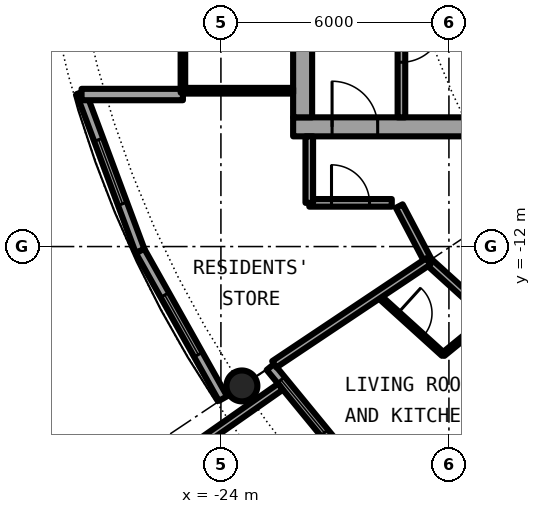
"""IFC4 building model, lengths in metres.
Left out: names, types, materials, properties, quantities, classifications, styles, units other than length and angle.
Written with IfcOpenShell. Run it as: python <this file> out.ifc"""

import sys

from ifc_helpers import new_model, si_unit, direction, frame, frame_2d, origin, origin_2d, place, context, subcontext, project, spatial, rectangle, hollow_circle, extrude, element, fill, save


model = new_model("IFC4")
c1 = context("Model", 3, precision=1e-05, world=origin(), true_north=direction((0.0, 1.0)))
c2 = subcontext(c1, "Body", "Model", "MODEL_VIEW")
j1 = project(units=[si_unit("LENGTHUNIT", "METRE"), si_unit("PLANEANGLEUNIT", "RADIAN")], contexts=[c1])
p1 = place(None, origin())
s1 = spatial("IfcSite", under=j1, at=p1, CompositionType="ELEMENT")
p2 = place(p1, origin())
s2 = spatial("IfcBuilding", under=s1, at=p2, CompositionType="ELEMENT")
p3 = place(p2, frame((0.0, 0.0, 161.6)))
s3 = spatial("IfcBuildingStorey", under=s2, at=p3, CompositionType="ELEMENT", Elevation=161.6)
p4 = place(p3, frame((-23.448, -15.667, 0.0), z_axis=(0.0, 0.0, 1.0), x_axis=(1.0, 0.0, 0.0)))
e1 = element("IfcColumn", 1, at=p4, inside=s3, PredefinedType="COLUMN", context=c2, shape_type="SweptSolid", body=[
    extrude(hollow_circle(Radius=0.406, WallThickness=0.04, at=origin_2d()), origin(), (0.0, 0.0, 1.0), 3.05),
])
p5 = place(p3, frame((-22.699, -15.167, 0.0), z_axis=(0.0, 0.0, 1.0), x_axis=(0.634382322723, -0.773019449054, 0.0)))
e2 = element("IfcWall", 2, at=p5, inside=s3, PredefinedType="SOLIDWALL", context=c2, shape_type="SweptSolid", body=[
    extrude(rectangle(XDim=5.352, YDim=0.25, at=frame_2d((2.676, 0.0))), origin(), (0.0, 0.0, 1.0), 2.7),
])
p6 = place(p5, frame((0.441, 0.0, 0.3)))
e3 = element("IfcOpeningElement", 3, at=p6, cuts=e2, PredefinedType="OPENING", context=c2, shape_type="SweptSolid", body=[
    extrude(rectangle(XDim=1.8, YDim=2.1, at=frame_2d((0.9, 1.05))), frame((0.0, 0.135, 0.0), z_axis=(0.0, -1.0, 0.0), x_axis=(1.0, 0.0, 0.0)), (0.0, 0.0, 1.0), 0.27),
])
p7 = place(p5, frame((3.51, 0.0, 0.0)))
e4 = element("IfcOpeningElement", 4, at=p7, cuts=e2, PredefinedType="OPENING", context=c2, shape_type="SweptSolid", body=[
    extrude(rectangle(XDim=1.0, YDim=2.2, at=frame_2d((0.5, 1.1))), frame((0.0, 0.135, 0.0), z_axis=(0.0, -1.0, 0.0), x_axis=(1.0, 0.0, 0.0)), (0.0, 0.0, 1.0), 0.27),
])
p8 = place(p3, frame((-22.433, -15.688, -0.03), z_axis=(0.0, 0.0, 1.0), x_axis=(-0.819373043115, -0.573260687834, 0.0)))
e5 = element("IfcWall", 5, at=p8, inside=s3, PredefinedType="SOLIDWALL", context=c2, shape_type="SweptSolid", body=[
    extrude(rectangle(XDim=2.925, YDim=0.2, at=frame_2d((1.463, 0.0))), origin(), (0.0, 0.0, 1.0), 2.73),
])
p9 = place(p3, frame((-27.682, -7.945, 0.0), z_axis=(0.0, 0.0, 1.0), x_axis=(0.349247811493, -0.937030397675, 0.0)))
e6 = element("IfcWall", 6, at=p9, inside=s3, PredefinedType="SOLIDWALL", context=c2, shape_type="SweptSolid", body=[
    extrude(rectangle(XDim=4.452, YDim=0.25, at=frame_2d((2.226, 0.0))), origin(), (0.0, 0.0, 1.0), 2.7),
])
p10 = place(p9, frame((1.327, 0.0, 0.3)))
e7 = element("IfcOpeningElement", 7, at=p10, cuts=e6, PredefinedType="OPENING", context=c2, shape_type="SweptSolid", body=[
    extrude(rectangle(XDim=1.8, YDim=2.1, at=frame_2d((0.9, 1.05))), frame((0.0, 0.135, 0.0), z_axis=(0.0, -1.0, 0.0), x_axis=(1.0, 0.0, 0.0)), (0.0, 0.0, 1.0), 0.27),
])
p11 = place(p3, frame((-26.127, -12.117, 0.0), z_axis=(0.0, 0.0, 1.0), x_axis=(0.489696356642, -0.871893042919, 0.0)))
e8 = element("IfcWall", 8, at=p11, inside=s3, PredefinedType="SOLIDWALL", context=c2, shape_type="SweptSolid", body=[
    extrude(rectangle(XDim=4.454, YDim=0.25, at=frame_2d((2.227, 0.0))), origin(), (0.0, 0.0, 1.0), 2.7),
])
p12 = place(p11, frame((1.327, 0.0, 0.3)))
e9 = element("IfcOpeningElement", 9, at=p12, cuts=e8, PredefinedType="OPENING", context=c2, shape_type="SweptSolid", body=[
    extrude(rectangle(XDim=1.8, YDim=2.1, at=frame_2d((0.9, 1.05))), frame((0.0, 0.135, 0.0), z_axis=(0.0, -1.0, 0.0), x_axis=(1.0, 0.0, 0.0)), (0.0, 0.0, 1.0), 0.27),
])
p13 = place(p3, frame((-25.0, -8.0, 0.0), z_axis=(0.0, 0.0, 1.0), x_axis=(-1.0, 0.0, 0.0)))
e10 = element("IfcWall", 10, at=p13, inside=s3, PredefinedType="SOLIDWALL", context=c2, shape_type="SweptSolid", body=[
    extrude(rectangle(XDim=2.667, YDim=0.3, at=frame_2d((1.333, 0.0))), origin(), (0.0, 0.0, 1.0), 2.7),
])
p14 = place(p3, frame((-22.1, -8.85, 0.0), z_axis=(0.0, 0.0, 1.0), x_axis=(1.0, 0.0, 0.0)))
e11 = element("IfcWall", 11, at=p14, inside=s3, PredefinedType="SHEAR", context=c2, shape_type="SweptSolid", body=[
    extrude(rectangle(XDim=13.6, YDim=0.5, at=frame_2d((6.8, 0.0))), origin(), (0.0, 0.0, 1.0), 3.05),
])
p15 = place(p14, frame((1.025, 0.0, 0.0)))
e12 = element("IfcOpeningElement", 12, at=p15, cuts=e11, PredefinedType="OPENING", context=c2, shape_type="SweptSolid", body=[
    extrude(rectangle(XDim=1.2, YDim=2.3, at=frame_2d((0.6, 1.15))), frame((0.0, 0.26, 0.0), z_axis=(0.0, -1.0, 0.0), x_axis=(1.0, 0.0, 0.0)), (0.0, 0.0, 1.0), 0.52),
])
p16 = place(p3, frame((-21.85, -8.6, 0.0), z_axis=(0.0, 0.0, 1.0), x_axis=(0.0, 1.0, 0.0)))
e13 = element("IfcWall", 13, at=p16, inside=s3, PredefinedType="SHEAR", context=c2, shape_type="SweptSolid", body=[
    extrude(rectangle(XDim=17.2, YDim=0.5, at=frame_2d((8.6, 0.0))), origin(), (0.0, 0.0, 1.0), 3.05),
])
p17 = place(p16, frame((7.7, 0.0, 0.0)))
e14 = element("IfcOpeningElement", 14, at=p17, cuts=e13, PredefinedType="OPENING", context=c2, shape_type="SweptSolid", body=[
    extrude(rectangle(XDim=1.8, YDim=2.3, at=frame_2d((0.9, 1.15))), frame((0.0, 0.26, 0.0), z_axis=(0.0, -1.0, 0.0), x_axis=(1.0, 0.0, 0.0)), (0.0, 0.0, 1.0), 0.52),
])
p18 = place(p3, frame((-19.25, -1.575, 0.0), z_axis=(0.0, 0.0, 1.0), x_axis=(0.0, -1.0, 0.0)))
e15 = element("IfcWall", 15, at=p18, inside=s3, PredefinedType="SOLIDWALL", context=c2, shape_type="SweptSolid", body=[
    extrude(rectangle(XDim=7.025, YDim=0.2, at=frame_2d((3.513, 0.0))), origin(), (0.0, 0.0, 1.0), 2.7),
])
p19 = place(p18, frame((4.475, 0.0, 0.0)))
e16 = element("IfcOpeningElement", 16, at=p19, cuts=e15, PredefinedType="OPENING", context=c2, shape_type="SweptSolid", body=[
    extrude(rectangle(XDim=1.1, YDim=2.3, at=frame_2d((0.55, 1.15))), frame((0.0, 0.11, 0.0), z_axis=(0.0, -1.0, 0.0), x_axis=(1.0, 0.0, 0.0)), (0.0, 0.0, 1.0), 0.22),
])
p20 = place(p3, frame((-22.1, -7.9, 0.0), z_axis=(0.0, 0.0, 1.0), x_axis=(-1.0, 0.0, 0.0)))
e17 = element("IfcWall", 17, at=p20, inside=s3, PredefinedType="PARTITIONING", context=c2, shape_type="SweptSolid", body=[
    extrude(rectangle(XDim=2.84, YDim=0.15, at=frame_2d((1.42, 0.0))), origin(), (0.0, 0.0, 1.0), 2.7),
])
p21 = place(p3, frame((-25.0, 7.95, 0.0), z_axis=(0.0, 0.0, 1.0), x_axis=(0.0, -1.0, 0.0)))
e18 = element("IfcWall", 18, at=p21, inside=s3, PredefinedType="PARTITIONING", context=c2, shape_type="SweptSolid", body=[
    extrude(rectangle(XDim=15.9, YDim=0.12, at=frame_2d((7.95, 0.0))), origin(), (0.0, 0.0, 1.0), 2.7),
])
p22 = place(p21, frame((0.95, 0.0, 0.1)))
e19 = element("IfcOpeningElement", 19, at=p22, cuts=e18, PredefinedType="OPENING", context=c2, shape_type="SweptSolid", body=[
    extrude(rectangle(XDim=14.0, YDim=2.35, at=frame_2d((7.0, 1.175))), frame((0.0, 0.07, 0.0), z_axis=(0.0, -1.0, 0.0), x_axis=(1.0, 0.0, 0.0)), (0.0, 0.0, 1.0), 0.14),
])
p23 = place(p3, frame((-19.872, -13.278, 0.0), z_axis=(0.0, 0.0, 1.0), x_axis=(0.740990220108, -0.671515817911, 0.0)))
e20 = element("IfcWall", 20, at=p23, inside=s3, PredefinedType="PARTITIONING", context=c2, shape_type="SweptSolid", body=[
    extrude(rectangle(XDim=2.323, YDim=0.1, at=frame_2d((1.161, 0.0))), origin(), (0.0, 0.0, 1.0), 2.7),
])
p24 = place(p23, frame((0.711, 0.0, 0.0)))
e21 = element("IfcOpeningElement", 21, at=p24, cuts=e20, PredefinedType="OPENING", context=c2, shape_type="SweptSolid", body=[
    extrude(rectangle(XDim=0.9, YDim=2.3, at=frame_2d((0.45, 1.15))), frame((0.0, 0.06, 0.0), z_axis=(0.0, -1.0, 0.0), x_axis=(1.0, 0.0, 0.0)), (0.0, 0.0, 1.0), 0.12),
])
p25 = place(p3, frame((-19.307, -10.935, 0.0), z_axis=(0.0, 0.0, 1.0), x_axis=(0.465605550524, -0.884992356646, 0.0)))
e22 = element("IfcWall", 22, at=p25, inside=s3, PredefinedType="PARTITIONING", context=c2, shape_type="SweptSolid", body=[
    extrude(rectangle(XDim=1.643, YDim=0.2, at=frame_2d((0.821, 0.0))), origin(), (0.0, 0.0, 1.0), 2.7),
])
p26 = place(p3, frame((-18.542, -12.389, 0.0), z_axis=(0.0, 0.0, 1.0), x_axis=(0.740947367223, -0.671563101283, 0.0)))
e23 = element("IfcWall", 23, at=p26, inside=s3, PredefinedType="PARTITIONING", context=c2, shape_type="SweptSolid", body=[
    extrude(rectangle(XDim=10.837, YDim=0.2, at=frame_2d((5.419, 0.0))), origin(), (0.0, 0.0, 1.0), 2.7),
])
p27 = place(p26, frame((6.002, 0.0, 0.0)))
e24 = element("IfcOpeningElement", 24, at=p27, cuts=e23, PredefinedType="OPENING", context=c2, shape_type="SweptSolid", body=[
    extrude(rectangle(XDim=1.0, YDim=2.3, at=frame_2d((0.5, 1.15))), frame((0.0, 0.11, 0.0), z_axis=(0.0, -1.0, 0.0), x_axis=(1.0, 0.0, 0.0)), (0.0, 0.0, 1.0), 0.22),
])
p28 = place(p3, frame((-21.675, -10.85, 0.0), z_axis=(0.0, 0.0, 1.0), x_axis=(1.0, 0.0, 0.0)))
e25 = element("IfcWall", 25, at=p28, inside=s3, PredefinedType="PARTITIONING", context=c2, shape_type="SweptSolid", body=[
    extrude(rectangle(XDim=2.171, YDim=0.2, at=frame_2d((1.085, 0.0))), origin(), (0.0, 0.0, 1.0), 2.7),
])
p29 = place(p28, frame((0.585, 0.0, 0.0)))
e26 = element("IfcOpeningElement", 26, at=p29, cuts=e25, PredefinedType="OPENING", context=c2, shape_type="SweptSolid", body=[
    extrude(rectangle(XDim=1.0, YDim=2.3, at=frame_2d((0.5, 1.15))), frame((0.0, 0.11, 0.0), z_axis=(0.0, -1.0, 0.0), x_axis=(1.0, 0.0, 0.0)), (0.0, 0.0, 1.0), 0.22),
])
p30 = place(p3, frame((-22.595, -15.098, 0.0), z_axis=(0.0, 0.0, 1.0), x_axis=(0.831387096605, 0.55569370664, 0.0)))
e27 = element("IfcWall", 27, at=p30, inside=s3, PredefinedType="PARTITIONING", context=c2, shape_type="SweptSolid", body=[
    extrude(rectangle(XDim=4.875, YDim=0.2, at=frame_2d((2.438, 0.0))), origin(), (0.0, 0.0, 1.0), 2.7),
])
p31 = place(p3, frame((-19.231, -19.2, 0.0), z_axis=(0.0, 0.0, 1.0), x_axis=(0.707722727509, 0.706490297858, 0.0)))
e28 = element("IfcWall", 28, at=p31, inside=s3, PredefinedType="PARTITIONING", context=c2, shape_type="SweptSolid", body=[
    extrude(rectangle(XDim=3.962, YDim=0.1, at=frame_2d((1.981, 0.0))), origin(), (0.0, 0.0, 1.0), 2.7),
])
p32 = place(p31, frame((1.531, 0.0, 0.0)))
e29 = element("IfcOpeningElement", 29, at=p32, cuts=e28, PredefinedType="OPENING", context=c2, shape_type="SweptSolid", body=[
    extrude(rectangle(XDim=0.9, YDim=2.3, at=frame_2d((0.45, 1.15))), frame((0.0, 0.06, 0.0), z_axis=(0.0, -1.0, 0.0), x_axis=(1.0, 0.0, 0.0)), (0.0, 0.0, 1.0), 0.12),
])
p33 = place(p3, frame((-18.151, -14.838, 0.0), z_axis=(0.0, 0.0, 1.0), x_axis=(0.774283039722, 0.632839453889, 0.0)))
e30 = element("IfcWall", 30, at=p33, inside=s3, PredefinedType="PARTITIONING", context=c2, shape_type="SweptSolid", body=[
    extrude(rectangle(XDim=1.569, YDim=0.1, at=frame_2d((0.785, 0.0))), origin(), (0.0, 0.0, 1.0), 2.7),
])
p34 = place(p3, frame((-21.675, -10.85, 0.0), z_axis=(0.0, 0.0, 1.0), x_axis=(0.0, 1.0, 0.0)))
e31 = element("IfcWall", 31, at=p34, inside=s3, PredefinedType="PARTITIONING", context=c2, shape_type="SweptSolid", body=[
    extrude(rectangle(XDim=1.75, YDim=0.2, at=frame_2d((0.875, 0.0))), origin(), (0.0, 0.0, 1.0), 2.7),
])
p35 = place(p6, origin())
e32 = element("IfcWindow", 32, at=p35, inside=s3, PartitioningType="SINGLE_PANEL", PredefinedType="WINDOW", context=c2, shape_type="SweptSolid", body=[
    extrude(rectangle(XDim=1.8, YDim=2.1, at=frame_2d((0.9, 1.05))), frame((0.0, 0.03, 0.0), z_axis=(0.0, -1.0, 0.0), x_axis=(1.0, 0.0, 0.0)), (0.0, 0.0, 1.0), 0.06),
])
fill(e3, e32)
p36 = place(p10, origin())
e33 = element("IfcWindow", 33, at=p36, inside=s3, PartitioningType="SINGLE_PANEL", PredefinedType="WINDOW", context=c2, shape_type="SweptSolid", body=[
    extrude(rectangle(XDim=1.8, YDim=2.1, at=frame_2d((0.9, 1.05))), frame((0.0, 0.03, 0.0), z_axis=(0.0, -1.0, 0.0), x_axis=(1.0, 0.0, 0.0)), (0.0, 0.0, 1.0), 0.06),
])
fill(e7, e33)
p37 = place(p12, origin())
e34 = element("IfcWindow", 34, at=p37, inside=s3, PartitioningType="SINGLE_PANEL", PredefinedType="WINDOW", context=c2, shape_type="SweptSolid", body=[
    extrude(rectangle(XDim=1.8, YDim=2.1, at=frame_2d((0.9, 1.05))), frame((0.0, 0.03, 0.0), z_axis=(0.0, -1.0, 0.0), x_axis=(1.0, 0.0, 0.0)), (0.0, 0.0, 1.0), 0.06),
])
fill(e9, e34)
p38 = place(p19, origin())
e35 = element("IfcDoor", 35, at=p38, inside=s3, OperationType="SINGLE_SWING_LEFT", PredefinedType="DOOR", context=c2, shape_type="SweptSolid", body=[
    extrude(rectangle(XDim=1.1, YDim=2.3, at=frame_2d((0.55, 1.15))), frame((0.0, 0.025, 0.0), z_axis=(0.0, -1.0, 0.0), x_axis=(1.0, 0.0, 0.0)), (0.0, 0.0, 1.0), 0.05),
])
fill(e16, e35)
p39 = place(p15, origin())
e36 = element("IfcDoor", 36, at=p39, inside=s3, OperationType="SINGLE_SWING_RIGHT", PredefinedType="DOOR", context=c2, shape_type="SweptSolid", body=[
    extrude(rectangle(XDim=1.2, YDim=2.3, at=frame_2d((0.6, 1.15))), frame((0.0, 0.025, 0.0), z_axis=(0.0, -1.0, 0.0), x_axis=(1.0, 0.0, 0.0)), (0.0, 0.0, 1.0), 0.05),
])
fill(e12, e36)
p40 = place(p22, origin())
e37 = element("IfcWindow", 37, at=p40, inside=s3, PartitioningType="SINGLE_PANEL", PredefinedType="WINDOW", context=c2, shape_type="SweptSolid", body=[
    extrude(rectangle(XDim=14.0, YDim=2.35, at=frame_2d((7.0, 1.175))), frame((0.0, 0.03, 0.0), z_axis=(0.0, -1.0, 0.0), x_axis=(1.0, 0.0, 0.0)), (0.0, 0.0, 1.0), 0.06),
])
fill(e19, e37)
p41 = place(p24, origin())
e38 = element("IfcDoor", 38, at=p41, inside=s3, OperationType="SINGLE_SWING_RIGHT", PredefinedType="DOOR", context=c2, shape_type="SweptSolid", body=[
    extrude(rectangle(XDim=0.9, YDim=2.3, at=frame_2d((0.45, 1.15))), frame((0.0, 0.025, 0.0), z_axis=(0.0, -1.0, 0.0), x_axis=(1.0, 0.0, 0.0)), (0.0, 0.0, 1.0), 0.05),
])
fill(e21, e38)
p42 = place(p29, origin())
e39 = element("IfcDoor", 39, at=p42, inside=s3, OperationType="SINGLE_SWING_LEFT", PredefinedType="DOOR", context=c2, shape_type="SweptSolid", body=[
    extrude(rectangle(XDim=1.0, YDim=2.3, at=frame_2d((0.5, 1.15))), frame((0.0, 0.025, 0.0), z_axis=(0.0, -1.0, 0.0), x_axis=(1.0, 0.0, 0.0)), (0.0, 0.0, 1.0), 0.05),
])
fill(e26, e39)
save(model, sys.argv[1])
